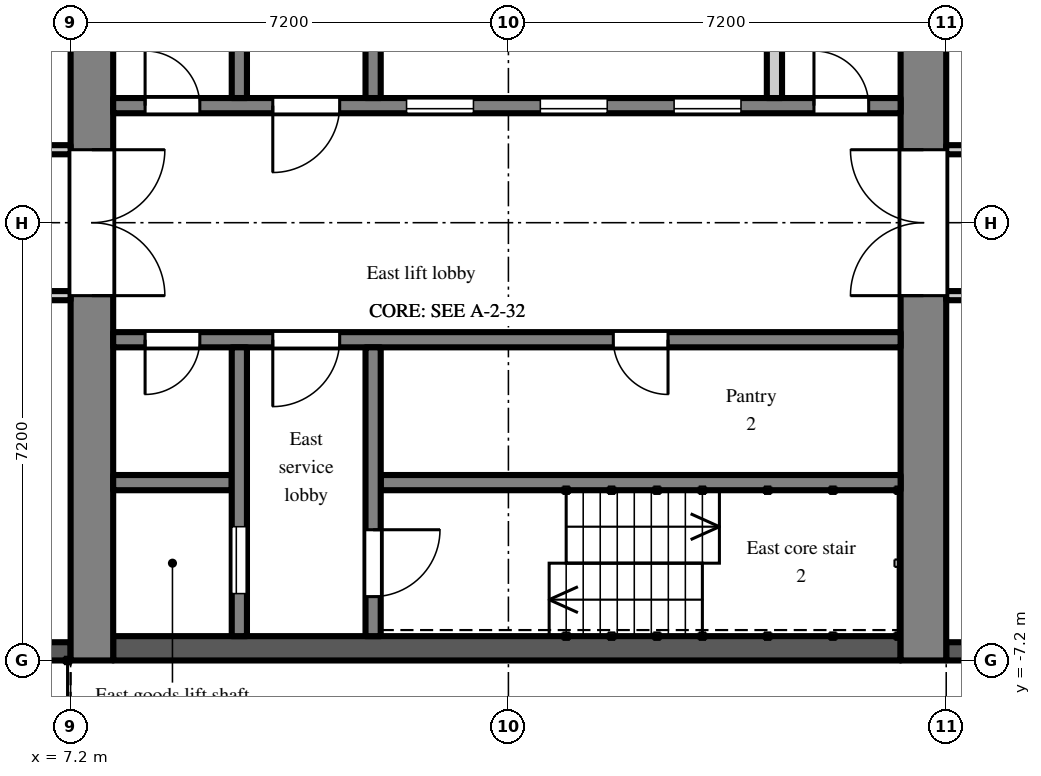
"""IFC4 building model, lengths in metres.
Left out: names, types, materials, properties, quantities, classifications, styles, units other than length and angle.
Written with IfcOpenShell. Run it as: python <this file> out.ifc"""

import sys

from ifc_helpers import new_model, si_unit, direction, frame, frame_2d, origin, place, context, subcontext, project, spatial, rectangle, extrude, element, fill, save


model = new_model("IFC4")
c1 = context("Model", 3, precision=1e-05, world=origin(), true_north=direction((0.0, 1.0)))
c2 = subcontext(c1, "Body", "Model", "MODEL_VIEW")
j1 = project(units=[si_unit("LENGTHUNIT", "METRE"), si_unit("PLANEANGLEUNIT", "RADIAN")], contexts=[c1])
p1 = place(None, origin())
s1 = spatial("IfcSite", under=j1, at=p1, CompositionType="ELEMENT")
p2 = place(p1, origin())
s2 = spatial("IfcBuilding", under=s1, at=p2, CompositionType="ELEMENT")
p3 = place(p2, frame((0.0, 0.0, 191.7)))
s3 = spatial("IfcBuildingStorey", under=s2, at=p3, CompositionType="ELEMENT", Elevation=191.7)
p4 = place(p3, frame((21.6, -7.05, 0.0), z_axis=(0.0, 0.0, 1.0), x_axis=(1.0, 0.0, 0.0)))
e1 = element("IfcWall", 1, at=p4, inside=s3, PredefinedType="SOLIDWALL", context=c2, shape_type="SweptSolid", body=[
    extrude(rectangle(XDim=2.7, YDim=0.3, at=frame_2d((1.35, 0.0))), origin(), (0.0, 0.0, 1.0), 2.3),
])
p5 = place(p4, frame((0.75, 0.0, 0.2)))
e2 = element("IfcOpeningElement", 2, at=p5, cuts=e1, PredefinedType="OPENING", context=c2, shape_type="SweptSolid", body=[
    extrude(rectangle(XDim=1.2, YDim=1.85, at=frame_2d((0.6, 0.925))), frame((0.0, 0.16, 0.0), z_axis=(0.0, -1.0, 0.0), x_axis=(1.0, 0.0, 0.0)), (0.0, 0.0, 1.0), 0.32),
])
p6 = place(p3, frame((4.2, -7.05, 0.0), z_axis=(0.0, 0.0, 1.0), x_axis=(1.0, 0.0, 0.0)))
e3 = element("IfcWall", 3, at=p6, inside=s3, PredefinedType="SOLIDWALL", context=c2, shape_type="SweptSolid", body=[
    extrude(rectangle(XDim=3.0, YDim=0.3, at=frame_2d((1.5, 0.0))), origin(), (0.0, 0.0, 1.0), 2.55),
])
p7 = place(p3, frame((7.55, -7.2, 0.0), z_axis=(0.0, 0.0, 1.0), x_axis=(0.0, 1.0, 0.0)))
e4 = element("IfcWall", 4, at=p7, inside=s3, PredefinedType="SHEAR", context=c2, shape_type="SweptSolid", body=[
    extrude(rectangle(XDim=14.4, YDim=0.7, at=frame_2d((7.2, 0.0))), origin(), (0.0, 0.0, 1.0), 2.55),
])
p8 = place(p7, frame((6.0, 0.0, 0.0)))
e5 = element("IfcOpeningElement", 5, at=p8, cuts=e4, PredefinedType="OPENING", context=c2, shape_type="SweptSolid", body=[
    extrude(rectangle(XDim=2.4, YDim=2.2, at=frame_2d((1.2, 1.1))), frame((0.0, 0.36, 0.0), z_axis=(0.0, -1.0, 0.0), x_axis=(1.0, 0.0, 0.0)), (0.0, 0.0, 1.0), 0.72),
])
p9 = place(p3, frame((21.225, -7.2, 0.0), z_axis=(0.0, 0.0, 1.0), x_axis=(0.0, 1.0, 0.0)))
e6 = element("IfcWall", 6, at=p9, inside=s3, PredefinedType="SHEAR", context=c2, shape_type="SweptSolid", body=[
    extrude(rectangle(XDim=14.4, YDim=0.75, at=frame_2d((7.2, 0.0))), origin(), (0.0, 0.0, 1.0), 2.55),
])
p10 = place(p9, frame((6.0, 0.0, 0.0)))
e7 = element("IfcOpeningElement", 7, at=p10, cuts=e6, PredefinedType="OPENING", context=c2, shape_type="SweptSolid", body=[
    extrude(rectangle(XDim=2.4, YDim=2.2, at=frame_2d((1.2, 1.1))), frame((0.0, 0.385, 0.0), z_axis=(0.0, -1.0, 0.0), x_axis=(1.0, 0.0, 0.0)), (0.0, 0.0, 1.0), 0.77),
])
p11 = place(p3, frame((7.9, 1.925, 0.0), z_axis=(0.0, 0.0, 1.0), x_axis=(1.0, 0.0, 0.0)))
e8 = element("IfcWall", 8, at=p11, inside=s3, PredefinedType="SHEAR", context=c2, shape_type="SweptSolid", body=[
    extrude(rectangle(XDim=12.95, YDim=0.25, at=frame_2d((6.475, 0.0))), origin(), (0.0, 0.0, 1.0), 2.55),
])
p12 = place(p11, frame((4.825, 0.0, 0.0)))
e9 = element("IfcOpeningElement", 9, at=p12, cuts=e8, PredefinedType="OPENING", context=c2, shape_type="SweptSolid", body=[
    extrude(rectangle(XDim=1.1, YDim=2.1, at=frame_2d((0.55, 1.05))), frame((0.0, 0.135, 0.0), z_axis=(0.0, -1.0, 0.0), x_axis=(1.0, 0.0, 0.0)), (0.0, 0.0, 1.0), 0.27),
])
p13 = place(p11, frame((7.025, 0.0, 0.0)))
e10 = element("IfcOpeningElement", 10, at=p13, cuts=e8, PredefinedType="OPENING", context=c2, shape_type="SweptSolid", body=[
    extrude(rectangle(XDim=1.1, YDim=2.1, at=frame_2d((0.55, 1.05))), frame((0.0, 0.135, 0.0), z_axis=(0.0, -1.0, 0.0), x_axis=(1.0, 0.0, 0.0)), (0.0, 0.0, 1.0), 0.27),
])
p14 = place(p11, frame((9.225, 0.0, 0.0)))
e11 = element("IfcOpeningElement", 11, at=p14, cuts=e8, PredefinedType="OPENING", context=c2, shape_type="SweptSolid", body=[
    extrude(rectangle(XDim=1.1, YDim=2.1, at=frame_2d((0.55, 1.05))), frame((0.0, 0.135, 0.0), z_axis=(0.0, -1.0, 0.0), x_axis=(1.0, 0.0, 0.0)), (0.0, 0.0, 1.0), 0.27),
])
p15 = place(p11, frame((0.525, 0.0, 0.0)))
e12 = element("IfcOpeningElement", 12, at=p15, cuts=e8, PredefinedType="OPENING", context=c2, shape_type="SweptSolid", body=[
    extrude(rectangle(XDim=0.9, YDim=2.1, at=frame_2d((0.45, 1.05))), frame((0.0, 0.135, 0.0), z_axis=(0.0, -1.0, 0.0), x_axis=(1.0, 0.0, 0.0)), (0.0, 0.0, 1.0), 0.27),
])
p16 = place(p11, frame((2.625, 0.0, 0.0)))
e13 = element("IfcOpeningElement", 13, at=p16, cuts=e8, PredefinedType="OPENING", context=c2, shape_type="SweptSolid", body=[
    extrude(rectangle(XDim=1.1, YDim=2.1, at=frame_2d((0.55, 1.05))), frame((0.0, 0.135, 0.0), z_axis=(0.0, -1.0, 0.0), x_axis=(1.0, 0.0, 0.0)), (0.0, 0.0, 1.0), 0.27),
])
p17 = place(p11, frame((11.525, 0.0, 0.0)))
e14 = element("IfcOpeningElement", 14, at=p17, cuts=e8, PredefinedType="OPENING", context=c2, shape_type="SweptSolid", body=[
    extrude(rectangle(XDim=0.9, YDim=2.1, at=frame_2d((0.45, 1.05))), frame((0.0, 0.135, 0.0), z_axis=(0.0, -1.0, 0.0), x_axis=(1.0, 0.0, 0.0)), (0.0, 0.0, 1.0), 0.27),
])
p18 = place(p3, frame((9.975, 2.05, 0.0), z_axis=(0.0, 0.0, 1.0), x_axis=(0.0, 1.0, 0.0)))
e15 = element("IfcWall", 15, at=p18, inside=s3, PredefinedType="SHEAR", context=c2, shape_type="SweptSolid", body=[
    extrude(rectangle(XDim=4.75, YDim=0.25, at=frame_2d((2.375, 0.0))), origin(), (0.0, 0.0, 1.0), 2.55),
])
p19 = place(p18, frame((2.95, 0.0, 0.0)))
e16 = element("IfcOpeningElement", 16, at=p19, cuts=e15, PredefinedType="OPENING", context=c2, shape_type="SweptSolid", body=[
    extrude(rectangle(XDim=1.1, YDim=2.1, at=frame_2d((0.55, 1.05))), frame((0.0, 0.135, 0.0), z_axis=(0.0, -1.0, 0.0), x_axis=(1.0, 0.0, 0.0)), (0.0, 0.0, 1.0), 0.27),
])
p20 = place(p3, frame((12.175, 2.05, 0.0), z_axis=(0.0, 0.0, 1.0), x_axis=(0.0, 1.0, 0.0)))
e17 = element("IfcWall", 17, at=p20, inside=s3, PredefinedType="SHEAR", context=c2, shape_type="SweptSolid", body=[
    extrude(rectangle(XDim=4.75, YDim=0.25, at=frame_2d((2.375, 0.0))), origin(), (0.0, 0.0, 1.0), 2.55),
])
p21 = place(p20, frame((3.0, 0.0, 0.0)))
e18 = element("IfcOpeningElement", 18, at=p21, cuts=e17, PredefinedType="OPENING", context=c2, shape_type="SweptSolid", body=[
    extrude(rectangle(XDim=1.1, YDim=2.1, at=frame_2d((0.55, 1.05))), frame((0.0, 0.135, 0.0), z_axis=(0.0, -1.0, 0.0), x_axis=(1.0, 0.0, 0.0)), (0.0, 0.0, 1.0), 0.27),
])
p22 = place(p3, frame((18.775, 2.05, 0.0), z_axis=(0.0, 0.0, 1.0), x_axis=(0.0, 1.0, 0.0)))
e19 = element("IfcWall", 19, at=p22, inside=s3, PredefinedType="PARTITIONING", context=c2, shape_type="SweptSolid", body=[
    extrude(rectangle(XDim=2.1, YDim=0.25, at=frame_2d((1.05, 0.0))), origin(), (0.0, 0.0, 1.0), 2.55),
])
p23 = place(p3, frame((7.9, -7.0, 0.0), z_axis=(0.0, 0.0, 1.0), x_axis=(1.0, 0.0, 0.0)))
e20 = element("IfcWall", 20, at=p23, inside=s3, PredefinedType="SHEAR", context=c2, shape_type="SweptSolid", body=[
    extrude(rectangle(XDim=12.95, YDim=0.4, at=frame_2d((6.475, 0.0))), origin(), (0.0, 0.0, 1.0), 2.55),
])
p24 = place(p3, frame((7.9, -1.925, 0.0), z_axis=(0.0, 0.0, 1.0), x_axis=(1.0, 0.0, 0.0)))
e21 = element("IfcWall", 21, at=p24, inside=s3, PredefinedType="SHEAR", context=c2, shape_type="SweptSolid", body=[
    extrude(rectangle(XDim=12.95, YDim=0.25, at=frame_2d((6.475, 0.0))), origin(), (0.0, 0.0, 1.0), 2.55),
])
p25 = place(p24, frame((0.525, 0.0, 0.0)))
e22 = element("IfcOpeningElement", 22, at=p25, cuts=e21, PredefinedType="OPENING", context=c2, shape_type="SweptSolid", body=[
    extrude(rectangle(XDim=0.9, YDim=2.1, at=frame_2d((0.45, 1.05))), frame((0.0, 0.135, 0.0), z_axis=(0.0, -1.0, 0.0), x_axis=(1.0, 0.0, 0.0)), (0.0, 0.0, 1.0), 0.27),
])
p26 = place(p24, frame((2.625, 0.0, 0.0)))
e23 = element("IfcOpeningElement", 23, at=p26, cuts=e21, PredefinedType="OPENING", context=c2, shape_type="SweptSolid", body=[
    extrude(rectangle(XDim=1.1, YDim=2.1, at=frame_2d((0.55, 1.05))), frame((0.0, 0.135, 0.0), z_axis=(0.0, -1.0, 0.0), x_axis=(1.0, 0.0, 0.0)), (0.0, 0.0, 1.0), 0.27),
])
p27 = place(p24, frame((8.225, 0.0, 0.0)))
e24 = element("IfcOpeningElement", 24, at=p27, cuts=e21, PredefinedType="OPENING", context=c2, shape_type="SweptSolid", body=[
    extrude(rectangle(XDim=0.9, YDim=2.1, at=frame_2d((0.45, 1.05))), frame((0.0, 0.135, 0.0), z_axis=(0.0, -1.0, 0.0), x_axis=(1.0, 0.0, 0.0)), (0.0, 0.0, 1.0), 0.27),
])
p28 = place(p3, frame((7.9, -4.275, 0.0), z_axis=(0.0, 0.0, 1.0), x_axis=(1.0, 0.0, 0.0)))
e25 = element("IfcWall", 25, at=p28, inside=s3, PredefinedType="SHEAR", context=c2, shape_type="SweptSolid", body=[
    extrude(rectangle(XDim=1.95, YDim=0.25, at=frame_2d((0.975, 0.0))), origin(), (0.0, 0.0, 1.0), 2.55),
])
p29 = place(p3, frame((12.3, -4.275, 0.0), z_axis=(0.0, 0.0, 1.0), x_axis=(1.0, 0.0, 0.0)))
e26 = element("IfcWall", 26, at=p29, inside=s3, PredefinedType="SHEAR", context=c2, shape_type="SweptSolid", body=[
    extrude(rectangle(XDim=8.55, YDim=0.25, at=frame_2d((4.275, 0.0))), origin(), (0.0, 0.0, 1.0), 2.55),
])
p30 = place(p3, frame((9.975, -2.05, 0.0), z_axis=(0.0, 0.0, 1.0), x_axis=(0.0, -1.0, 0.0)))
e27 = element("IfcWall", 27, at=p30, inside=s3, PredefinedType="SHEAR", context=c2, shape_type="SweptSolid", body=[
    extrude(rectangle(XDim=4.75, YDim=0.25, at=frame_2d((2.375, 0.0))), origin(), (0.0, 0.0, 1.0), 2.55),
])
p31 = place(p30, frame((2.95, 0.0, 0.0)))
e28 = element("IfcOpeningElement", 28, at=p31, cuts=e27, PredefinedType="OPENING", context=c2, shape_type="SweptSolid", body=[
    extrude(rectangle(XDim=1.1, YDim=2.1, at=frame_2d((0.55, 1.05))), frame((0.0, 0.135, 0.0), z_axis=(0.0, -1.0, 0.0), x_axis=(1.0, 0.0, 0.0)), (0.0, 0.0, 1.0), 0.27),
])
p32 = place(p3, frame((12.175, -2.05, 0.0), z_axis=(0.0, 0.0, 1.0), x_axis=(0.0, -1.0, 0.0)))
e29 = element("IfcWall", 29, at=p32, inside=s3, PredefinedType="SHEAR", context=c2, shape_type="SweptSolid", body=[
    extrude(rectangle(XDim=4.75, YDim=0.25, at=frame_2d((2.375, 0.0))), origin(), (0.0, 0.0, 1.0), 2.55),
])
p33 = place(p32, frame((3.0, 0.0, 0.0)))
e30 = element("IfcOpeningElement", 30, at=p33, cuts=e29, PredefinedType="OPENING", context=c2, shape_type="SweptSolid", body=[
    extrude(rectangle(XDim=1.1, YDim=2.1, at=frame_2d((0.55, 1.05))), frame((0.0, 0.135, 0.0), z_axis=(0.0, -1.0, 0.0), x_axis=(1.0, 0.0, 0.0)), (0.0, 0.0, 1.0), 0.27),
])
p34 = place(p3, frame((1.275, -1.2, 0.0), z_axis=(0.0, 0.0, 1.0), x_axis=(1.0, 0.0, 0.0)))
e31 = element("IfcWall", 31, at=p34, inside=s3, PredefinedType="PARTITIONING", context=c2, shape_type="SweptSolid", body=[
    extrude(rectangle(XDim=5.925, YDim=0.15, at=frame_2d((2.962, 0.0))), origin(), (0.0, 0.0, 1.0), 2.55),
])
p35 = place(p34, frame((2.475, 0.0, 0.0)))
e32 = element("IfcOpeningElement", 32, at=p35, cuts=e31, PredefinedType="OPENING", context=c2, shape_type="SweptSolid", body=[
    extrude(rectangle(XDim=0.9, YDim=2.1, at=frame_2d((0.45, 1.05))), frame((0.0, 0.085, 0.0), z_axis=(0.0, -1.0, 0.0), x_axis=(1.0, 0.0, 0.0)), (0.0, 0.0, 1.0), 0.17),
])
p36 = place(p34, frame((4.475, 0.0, 0.0)))
e33 = element("IfcOpeningElement", 33, at=p36, cuts=e31, PredefinedType="OPENING", context=c2, shape_type="SweptSolid", body=[
    extrude(rectangle(XDim=0.9, YDim=2.1, at=frame_2d((0.45, 1.05))), frame((0.0, 0.085, 0.0), z_axis=(0.0, -1.0, 0.0), x_axis=(1.0, 0.0, 0.0)), (0.0, 0.0, 1.0), 0.17),
])
p37 = place(p3, frame((1.275, 1.2, 0.0), z_axis=(0.0, 0.0, 1.0), x_axis=(1.0, 0.0, 0.0)))
e34 = element("IfcWall", 34, at=p37, inside=s3, PredefinedType="PARTITIONING", context=c2, shape_type="SweptSolid", body=[
    extrude(rectangle(XDim=5.925, YDim=0.15, at=frame_2d((2.962, 0.0))), origin(), (0.0, 0.0, 1.0), 2.55),
])
p38 = place(p37, frame((0.675, 0.0, 0.0)))
e35 = element("IfcOpeningElement", 35, at=p38, cuts=e34, PredefinedType="OPENING", context=c2, shape_type="SweptSolid", body=[
    extrude(rectangle(XDim=0.9, YDim=2.1, at=frame_2d((0.45, 1.05))), frame((0.0, 0.085, 0.0), z_axis=(0.0, -1.0, 0.0), x_axis=(1.0, 0.0, 0.0)), (0.0, 0.0, 1.0), 0.17),
])
p39 = place(p37, frame((3.075, 0.0, 0.0)))
e36 = element("IfcOpeningElement", 36, at=p39, cuts=e34, PredefinedType="OPENING", context=c2, shape_type="SweptSolid", body=[
    extrude(rectangle(XDim=0.9, YDim=2.1, at=frame_2d((0.45, 1.05))), frame((0.0, 0.085, 0.0), z_axis=(0.0, -1.0, 0.0), x_axis=(1.0, 0.0, 0.0)), (0.0, 0.0, 1.0), 0.17),
])
p40 = place(p3, frame((21.6, -1.2, 0.0), z_axis=(0.0, 0.0, 1.0), x_axis=(1.0, 0.0, 0.0)))
e37 = element("IfcWall", 37, at=p40, inside=s3, PredefinedType="PARTITIONING", context=c2, shape_type="SweptSolid", body=[
    extrude(rectangle(XDim=5.125, YDim=0.15, at=frame_2d((2.562, 0.0))), origin(), (0.0, 0.0, 1.0), 2.55),
])
p41 = place(p40, frame((1.7, 0.0, 0.0)))
e38 = element("IfcOpeningElement", 38, at=p41, cuts=e37, PredefinedType="OPENING", context=c2, shape_type="SweptSolid", body=[
    extrude(rectangle(XDim=1.8, YDim=2.1, at=frame_2d((0.9, 1.05))), frame((0.0, 0.085, 0.0), z_axis=(0.0, -1.0, 0.0), x_axis=(1.0, 0.0, 0.0)), (0.0, 0.0, 1.0), 0.17),
])
p42 = place(p3, frame((21.6, 1.2, 0.0), z_axis=(0.0, 0.0, 1.0), x_axis=(1.0, 0.0, 0.0)))
e39 = element("IfcWall", 39, at=p42, inside=s3, PredefinedType="PARTITIONING", context=c2, shape_type="SweptSolid", body=[
    extrude(rectangle(XDim=5.125, YDim=0.15, at=frame_2d((2.562, 0.0))), origin(), (0.0, 0.0, 1.0), 2.55),
])
p43 = place(p42, frame((0.6, 0.0, 0.0)))
e40 = element("IfcOpeningElement", 40, at=p43, cuts=e39, PredefinedType="OPENING", context=c2, shape_type="SweptSolid", body=[
    extrude(rectangle(XDim=1.0, YDim=2.1, at=frame_2d((0.5, 1.05))), frame((0.0, 0.085, 0.0), z_axis=(0.0, -1.0, 0.0), x_axis=(1.0, 0.0, 0.0)), (0.0, 0.0, 1.0), 0.17),
])
p44 = place(p12, origin())
e41 = element("IfcDoor", 41, at=p44, inside=s3, OperationType="SLIDING_TO_LEFT", PredefinedType="DOOR", context=c2, shape_type="SweptSolid", body=[
    extrude(rectangle(XDim=1.1, YDim=2.1, at=frame_2d((0.55, 1.05))), frame((0.0, 0.025, 0.0), z_axis=(0.0, -1.0, 0.0), x_axis=(1.0, 0.0, 0.0)), (0.0, 0.0, 1.0), 0.05),
])
fill(e9, e41)
p45 = place(p13, origin())
e42 = element("IfcDoor", 42, at=p45, inside=s3, OperationType="SLIDING_TO_LEFT", PredefinedType="DOOR", context=c2, shape_type="SweptSolid", body=[
    extrude(rectangle(XDim=1.1, YDim=2.1, at=frame_2d((0.55, 1.05))), frame((0.0, 0.025, 0.0), z_axis=(0.0, -1.0, 0.0), x_axis=(1.0, 0.0, 0.0)), (0.0, 0.0, 1.0), 0.05),
])
fill(e10, e42)
p46 = place(p14, origin())
e43 = element("IfcDoor", 43, at=p46, inside=s3, OperationType="SLIDING_TO_LEFT", PredefinedType="DOOR", context=c2, shape_type="SweptSolid", body=[
    extrude(rectangle(XDim=1.1, YDim=2.1, at=frame_2d((0.55, 1.05))), frame((0.0, 0.025, 0.0), z_axis=(0.0, -1.0, 0.0), x_axis=(1.0, 0.0, 0.0)), (0.0, 0.0, 1.0), 0.05),
])
fill(e11, e43)
p47 = place(p31, origin())
e44 = element("IfcDoor", 44, at=p47, inside=s3, OperationType="SLIDING_TO_LEFT", PredefinedType="DOOR", context=c2, shape_type="SweptSolid", body=[
    extrude(rectangle(XDim=1.1, YDim=2.1, at=frame_2d((0.55, 1.05))), frame((0.0, 0.025, 0.0), z_axis=(0.0, -1.0, 0.0), x_axis=(1.0, 0.0, 0.0)), (0.0, 0.0, 1.0), 0.05),
])
fill(e28, e44)
p48 = place(p33, origin())
e45 = element("IfcDoor", 45, at=p48, inside=s3, OperationType="SINGLE_SWING_LEFT", PredefinedType="DOOR", context=c2, shape_type="SweptSolid", body=[
    extrude(rectangle(XDim=1.1, YDim=2.1, at=frame_2d((0.55, 1.05))), frame((0.0, 0.025, 0.0), z_axis=(0.0, -1.0, 0.0), x_axis=(1.0, 0.0, 0.0)), (0.0, 0.0, 1.0), 0.05),
])
fill(e30, e45)
p49 = place(p15, origin())
e46 = element("IfcDoor", 46, at=p49, inside=s3, OperationType="SINGLE_SWING_LEFT", PredefinedType="DOOR", context=c2, shape_type="SweptSolid", body=[
    extrude(rectangle(XDim=0.9, YDim=2.1, at=frame_2d((0.45, 1.05))), frame((0.0, 0.025, 0.0), z_axis=(0.0, -1.0, 0.0), x_axis=(1.0, 0.0, 0.0)), (0.0, 0.0, 1.0), 0.05),
])
fill(e12, e46)
p50 = place(p25, frame((0.9, 0.0, 0.0), z_axis=(0.0, 0.0, 1.0), x_axis=(-1.0, 0.0, 0.0)))
e47 = element("IfcDoor", 47, at=p50, inside=s3, OperationType="SINGLE_SWING_RIGHT", PredefinedType="DOOR", context=c2, shape_type="SweptSolid", body=[
    extrude(rectangle(XDim=0.9, YDim=2.1, at=frame_2d((0.45, 1.05))), frame((0.0, 0.025, 0.0), z_axis=(0.0, -1.0, 0.0), x_axis=(1.0, 0.0, 0.0)), (0.0, 0.0, 1.0), 0.05),
])
fill(e22, e47)
p51 = place(p16, frame((1.1, 0.0, 0.0), z_axis=(0.0, 0.0, 1.0), x_axis=(-1.0, 0.0, 0.0)))
e48 = element("IfcDoor", 48, at=p51, inside=s3, OperationType="SINGLE_SWING_RIGHT", PredefinedType="DOOR", context=c2, shape_type="SweptSolid", body=[
    extrude(rectangle(XDim=1.1, YDim=2.1, at=frame_2d((0.55, 1.05))), frame((0.0, 0.025, 0.0), z_axis=(0.0, -1.0, 0.0), x_axis=(1.0, 0.0, 0.0)), (0.0, 0.0, 1.0), 0.05),
])
fill(e13, e48)
p52 = place(p26, frame((1.1, 0.0, 0.0), z_axis=(0.0, 0.0, 1.0), x_axis=(-1.0, 0.0, 0.0)))
e49 = element("IfcDoor", 49, at=p52, inside=s3, OperationType="SINGLE_SWING_RIGHT", PredefinedType="DOOR", context=c2, shape_type="SweptSolid", body=[
    extrude(rectangle(XDim=1.1, YDim=2.1, at=frame_2d((0.55, 1.05))), frame((0.0, 0.025, 0.0), z_axis=(0.0, -1.0, 0.0), x_axis=(1.0, 0.0, 0.0)), (0.0, 0.0, 1.0), 0.05),
])
fill(e23, e49)
p53 = place(p8, frame((2.4, 0.0, 0.0), z_axis=(0.0, 0.0, 1.0), x_axis=(-1.0, 0.0, 0.0)))
e50 = element("IfcDoor", 50, at=p53, inside=s3, OperationType="DOUBLE_DOOR_DOUBLE_SWING", PredefinedType="DOOR", context=c2, shape_type="SweptSolid", body=[
    extrude(rectangle(XDim=2.4, YDim=2.2, at=frame_2d((1.2, 1.1))), frame((0.0, 0.025, 0.0), z_axis=(0.0, -1.0, 0.0), x_axis=(1.0, 0.0, 0.0)), (0.0, 0.0, 1.0), 0.05),
])
fill(e5, e50)
p54 = place(p10, origin())
e51 = element("IfcDoor", 51, at=p54, inside=s3, OperationType="DOUBLE_DOOR_DOUBLE_SWING", PredefinedType="DOOR", context=c2, shape_type="SweptSolid", body=[
    extrude(rectangle(XDim=2.4, YDim=2.2, at=frame_2d((1.2, 1.1))), frame((0.0, 0.025, 0.0), z_axis=(0.0, -1.0, 0.0), x_axis=(1.0, 0.0, 0.0)), (0.0, 0.0, 1.0), 0.05),
])
fill(e7, e51)
p55 = place(p17, origin())
e52 = element("IfcDoor", 52, at=p55, inside=s3, OperationType="SINGLE_SWING_LEFT", PredefinedType="DOOR", context=c2, shape_type="SweptSolid", body=[
    extrude(rectangle(XDim=0.9, YDim=2.1, at=frame_2d((0.45, 1.05))), frame((0.0, 0.025, 0.0), z_axis=(0.0, -1.0, 0.0), x_axis=(1.0, 0.0, 0.0)), (0.0, 0.0, 1.0), 0.05),
])
fill(e14, e52)
p56 = place(p27, frame((0.9, 0.0, 0.0), z_axis=(0.0, 0.0, 1.0), x_axis=(-1.0, 0.0, 0.0)))
e53 = element("IfcDoor", 53, at=p56, inside=s3, OperationType="SINGLE_SWING_LEFT", PredefinedType="DOOR", context=c2, shape_type="SweptSolid", body=[
    extrude(rectangle(XDim=0.9, YDim=2.1, at=frame_2d((0.45, 1.05))), frame((0.0, 0.025, 0.0), z_axis=(0.0, -1.0, 0.0), x_axis=(1.0, 0.0, 0.0)), (0.0, 0.0, 1.0), 0.05),
])
fill(e24, e53)
save(model, sys.argv[1])
